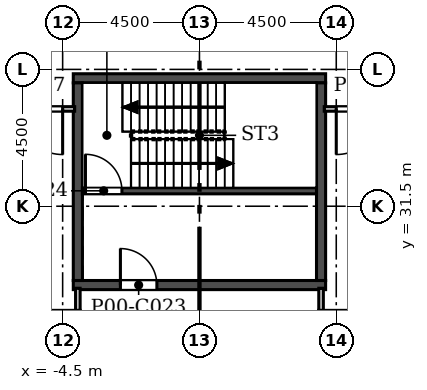
"""IFC4 building model, lengths in metres.
Left out: names, types, materials, properties, quantities, classifications, styles, units other than length and angle.
Written with IfcOpenShell. Run it as: python <this file> out.ifc"""

import sys

from ifc_helpers import new_model, si_unit, direction, frame, frame_2d, origin, place, context, subcontext, project, spatial, rectangle, extrude, element, fill, save


model = new_model("IFC4")
c1 = context("Model", 3, precision=1e-05, world=origin(), true_north=direction((0.0, 1.0)))
c2 = subcontext(c1, "Body", "Model", "MODEL_VIEW")
j1 = project(units=[si_unit("LENGTHUNIT", "METRE"), si_unit("PLANEANGLEUNIT", "RADIAN")], contexts=[c1])
p1 = place(None, origin())
s1 = spatial("IfcSite", under=j1, at=p1, CompositionType="ELEMENT")
p2 = place(p1, origin())
s2 = spatial("IfcBuilding", under=s1, at=p2, CompositionType="ELEMENT")
p3 = place(p2, origin())
s3 = spatial("IfcBuildingStorey", under=s2, at=p3, CompositionType="ELEMENT", Elevation=0.0)
p4 = place(p3, frame((-4.853, 74.393, 0.0), z_axis=(0.0, 0.0, 1.0), x_axis=(-0.499999725439, -0.866025562302, 0.0)))
e1 = element("IfcWall", 1, at=p4, inside=s3, PredefinedType="SOLIDWALL", context=c2, shape_type="SweptSolid", body=[
    extrude(rectangle(XDim=52.058, YDim=0.34, at=frame_2d((26.029, 0.0))), origin(), (0.0, 0.0, 1.0), 7.7),
])
p5 = place(p4, frame((19.058, 0.0, 0.9)))
e2 = element("IfcOpeningElement", 2, at=p5, cuts=e1, PredefinedType="OPENING", context=c2, shape_type="SweptSolid", body=[
    extrude(rectangle(XDim=1.885, YDim=3.5, at=frame_2d((0.942, 1.75))), frame((0.0, 0.18, 0.0), z_axis=(0.0, -1.0, 0.0), x_axis=(1.0, 0.0, 0.0)), (0.0, 0.0, 1.0), 0.36),
])
p6 = place(p4, frame((22.058, 0.0, 0.9)))
e3 = element("IfcOpeningElement", 3, at=p6, cuts=e1, PredefinedType="OPENING", context=c2, shape_type="SweptSolid", body=[
    extrude(rectangle(XDim=1.885, YDim=3.5, at=frame_2d((0.942, 1.75))), frame((0.0, 0.18, 0.0), z_axis=(0.0, -1.0, 0.0), x_axis=(1.0, 0.0, 0.0)), (0.0, 0.0, 1.0), 0.36),
])
p7 = place(p4, frame((40.058, 0.0, 0.9)))
e4 = element("IfcOpeningElement", 4, at=p7, cuts=e1, PredefinedType="OPENING", context=c2, shape_type="SweptSolid", body=[
    extrude(rectangle(XDim=1.885, YDim=3.5, at=frame_2d((0.942, 1.75))), frame((0.0, 0.18, 0.0), z_axis=(0.0, -1.0, 0.0), x_axis=(1.0, 0.0, 0.0)), (0.0, 0.0, 1.0), 0.36),
])
p8 = place(p4, frame((43.058, 0.0, 0.9)))
e5 = element("IfcOpeningElement", 5, at=p8, cuts=e1, PredefinedType="OPENING", context=c2, shape_type="SweptSolid", body=[
    extrude(rectangle(XDim=1.885, YDim=3.5, at=frame_2d((0.942, 1.75))), frame((0.0, 0.18, 0.0), z_axis=(0.0, -1.0, 0.0), x_axis=(1.0, 0.0, 0.0)), (0.0, 0.0, 1.0), 0.36),
])
p9 = place(p4, frame((48.279, 0.0, 0.0)))
e6 = element("IfcOpeningElement", 6, at=p9, cuts=e1, PredefinedType="OPENING", context=c2, shape_type="SweptSolid", body=[
    extrude(rectangle(XDim=2.4, YDim=2.7, at=frame_2d((1.2, 1.35))), frame((0.0, 0.18, 0.0), z_axis=(0.0, -1.0, 0.0), x_axis=(1.0, 0.0, 0.0)), (0.0, 0.0, 1.0), 0.36),
])
p10 = place(p4, frame((36.8, 0.0, 0.0)))
e7 = element("IfcOpeningElement", 7, at=p10, cuts=e1, PredefinedType="OPENING", context=c2, shape_type="SweptSolid", body=[
    extrude(rectangle(XDim=2.4, YDim=2.7, at=frame_2d((1.2, 1.35))), frame((0.0, 0.18, 0.0), z_axis=(0.0, -1.0, 0.0), x_axis=(1.0, 0.0, 0.0)), (0.0, 0.0, 1.0), 0.36),
])
p11 = place(p4, frame((31.06, 0.0, 0.0)))
e8 = element("IfcOpeningElement", 8, at=p11, cuts=e1, PredefinedType="OPENING", context=c2, shape_type="SweptSolid", body=[
    extrude(rectangle(XDim=2.4, YDim=2.7, at=frame_2d((1.2, 1.35))), frame((0.0, 0.18, 0.0), z_axis=(0.0, -1.0, 0.0), x_axis=(1.0, 0.0, 0.0)), (0.0, 0.0, 1.0), 0.36),
])
p12 = place(p4, frame((25.321, 0.0, 0.0)))
e9 = element("IfcOpeningElement", 9, at=p12, cuts=e1, PredefinedType="OPENING", context=c2, shape_type="SweptSolid", body=[
    extrude(rectangle(XDim=2.4, YDim=2.7, at=frame_2d((1.2, 1.35))), frame((0.0, 0.18, 0.0), z_axis=(0.0, -1.0, 0.0), x_axis=(1.0, 0.0, 0.0)), (0.0, 0.0, 1.0), 0.36),
])
p13 = place(p4, frame((13.842, 0.0, 0.0)))
e10 = element("IfcOpeningElement", 10, at=p13, cuts=e1, PredefinedType="OPENING", context=c2, shape_type="SweptSolid", body=[
    extrude(rectangle(XDim=2.4, YDim=2.7, at=frame_2d((1.2, 1.35))), frame((0.0, 0.18, 0.0), z_axis=(0.0, -1.0, 0.0), x_axis=(1.0, 0.0, 0.0)), (0.0, 0.0, 1.0), 0.36),
])
p14 = place(p4, frame((8.102, 0.0, 0.0)))
e11 = element("IfcOpeningElement", 11, at=p14, cuts=e1, PredefinedType="OPENING", context=c2, shape_type="SweptSolid", body=[
    extrude(rectangle(XDim=2.4, YDim=2.7, at=frame_2d((1.2, 1.35))), frame((0.0, 0.18, 0.0), z_axis=(0.0, -1.0, 0.0), x_axis=(1.0, 0.0, 0.0)), (0.0, 0.0, 1.0), 0.36),
])
p15 = place(p4, frame((2.363, 0.0, 0.0)))
e12 = element("IfcOpeningElement", 12, at=p15, cuts=e1, PredefinedType="OPENING", context=c2, shape_type="SweptSolid", body=[
    extrude(rectangle(XDim=2.4, YDim=2.7, at=frame_2d((1.2, 1.35))), frame((0.0, 0.18, 0.0), z_axis=(0.0, -1.0, 0.0), x_axis=(1.0, 0.0, 0.0)), (0.0, 0.0, 1.0), 0.36),
])
p16 = place(p3, frame((-4.15, 28.907, -0.4), z_axis=(0.0, 0.0, 1.0), x_axis=(1.0, 0.0, 0.0)))
e13 = element("IfcWall", 13, at=p16, inside=s3, PredefinedType="SOLIDWALL", context=c2, shape_type="SweptSolid", body=[
    extrude(rectangle(XDim=8.3, YDim=0.3, at=frame_2d((4.15, 0.0))), origin(), (0.0, 0.0, 1.0), 8.1),
])
p17 = place(p16, frame((1.55, 0.0, 0.4)))
e14 = element("IfcOpeningElement", 14, at=p17, cuts=e13, PredefinedType="OPENING", context=c2, shape_type="SweptSolid", body=[
    extrude(rectangle(XDim=1.2, YDim=2.1, at=frame_2d((0.6, 1.05))), frame((0.0, 0.16, 0.0), z_axis=(0.0, -1.0, 0.0), x_axis=(1.0, 0.0, 0.0)), (0.0, 0.0, 1.0), 0.32),
])
p18 = place(p3, frame((-4.15, 35.707, -0.4), z_axis=(0.0, 0.0, 1.0), x_axis=(1.0, 0.0, 0.0)))
e15 = element("IfcWall", 15, at=p18, inside=s3, PredefinedType="SOLIDWALL", context=c2, shape_type="SweptSolid", body=[
    extrude(rectangle(XDim=8.3, YDim=0.3, at=frame_2d((4.15, 0.0))), origin(), (0.0, 0.0, 1.0), 8.1),
])
for number, where, z_axis, x_axis in (
    (16, (-4.0, 29.057, -0.4), (0.0, 0.0, 1.0), (0.0, 1.0, 0.0)),
    (17, (4.0, 29.057, -0.4), (0.0, 0.0, 1.0), (0.0, 1.0, 0.0)),
):
    element("IfcWall", number, at=place(p3, frame(where, z_axis=z_axis, x_axis=x_axis)), inside=s3, PredefinedType="SOLIDWALL", context=c2, shape_type="SweptSolid", body=[
        extrude(rectangle(XDim=6.5, YDim=0.3, at=frame_2d((3.25, 0.0))), origin(), (0.0, 0.0, 1.0), 8.1),
    ])
p19 = place(p3, frame((-3.85, 32.007, -0.4), z_axis=(0.0, 0.0, 1.0), x_axis=(1.0, 0.0, 0.0)))
e18 = element("IfcWall", 18, at=p19, inside=s3, PredefinedType="SOLIDWALL", context=c2, shape_type="SweptSolid", body=[
    extrude(rectangle(XDim=7.7, YDim=0.2, at=frame_2d((3.85, 0.0))), origin(), (0.0, 0.0, 1.0), 8.1),
])
p20 = place(p19, frame((0.1, 0.0, 0.4)))
e19 = element("IfcOpeningElement", 19, at=p20, cuts=e18, PredefinedType="OPENING", context=c2, shape_type="SweptSolid", body=[
    extrude(rectangle(XDim=1.2, YDim=2.1, at=frame_2d((0.6, 1.05))), frame((0.0, 0.11, 0.0), z_axis=(0.0, -1.0, 0.0), x_axis=(1.0, 0.0, 0.0)), (0.0, 0.0, 1.0), 0.22),
])
p21 = place(p3, frame((-10.575, 28.0, 0.0), z_axis=(0.0, 0.0, 1.0), x_axis=(1.0, 0.0, 0.0)))
e20 = element("IfcWall", 20, at=p21, inside=s3, PredefinedType="PARTITIONING", context=c2, shape_type="SweptSolid", body=[
    extrude(rectangle(XDim=6.65, YDim=0.15, at=frame_2d((3.325, 0.0))), origin(), (0.0, 0.0, 1.0), 7.7),
])
p22 = place(p21, frame((2.475, 0.0, 0.0)))
e21 = element("IfcOpeningElement", 21, at=p22, cuts=e20, PredefinedType="OPENING", context=c2, shape_type="SweptSolid", body=[
    extrude(rectangle(XDim=3.0, YDim=2.4, at=frame_2d((1.5, 1.2))), frame((0.0, 0.085, 0.0), z_axis=(0.0, -1.0, 0.0), x_axis=(1.0, 0.0, 0.0)), (0.0, 0.0, 1.0), 0.17),
])
p23 = place(p3, frame((3.925, 28.0, 0.0), z_axis=(0.0, 0.0, 1.0), x_axis=(1.0, 0.0, 0.0)))
e22 = element("IfcWall", 22, at=p23, inside=s3, PredefinedType="PARTITIONING", context=c2, shape_type="SweptSolid", body=[
    extrude(rectangle(XDim=3.2, YDim=0.15, at=frame_2d((1.6, 0.0))), origin(), (0.0, 0.0, 1.0), 7.7),
])
p24 = place(p23, frame((0.08, 0.0, 0.0)))
e23 = element("IfcOpeningElement", 23, at=p24, cuts=e22, PredefinedType="OPENING", context=c2, shape_type="SweptSolid", body=[
    extrude(rectangle(XDim=3.0, YDim=2.4, at=frame_2d((1.5, 1.2))), frame((0.0, 0.085, 0.0), z_axis=(0.0, -1.0, 0.0), x_axis=(1.0, 0.0, 0.0)), (0.0, 0.0, 1.0), 0.17),
])
for number, where, z_axis, x_axis in (
    (24, (-4.0, 28.075, 0.0), (0.0, 0.0, 1.0), (0.0, 1.0, 0.0)),
    (25, (4.0, 28.802, 0.0), (0.0, 0.0, 1.0), (0.0, -1.0, 0.0)),
):
    element("IfcWall", number, at=place(p3, frame(where, z_axis=z_axis, x_axis=x_axis)), inside=s3, PredefinedType="PARTITIONING", context=c2, shape_type="SweptSolid", body=[
        extrude(rectangle(XDim=0.727, YDim=0.15, at=frame_2d((0.364, 0.0))), origin(), (0.0, 0.0, 1.0), 7.7),
    ])
p25 = place(p3, frame((-4.105, 34.7, 0.0), z_axis=(0.0, 0.0, 1.0), x_axis=(-1.0, 0.0, 0.0)))
e26 = element("IfcWall", 26, at=p25, inside=s3, PredefinedType="PARTITIONING", context=c2, shape_type="SweptSolid", body=[
    extrude(rectangle(XDim=4.47, YDim=0.15, at=frame_2d((2.235, 0.0))), origin(), (0.0, 0.0, 1.0), 7.7),
])
p26 = place(p25, frame((0.395, 0.0, 0.0)))
e27 = element("IfcOpeningElement", 27, at=p26, cuts=e26, PredefinedType="OPENING", context=c2, shape_type="SweptSolid", body=[
    extrude(rectangle(XDim=3.0, YDim=2.4, at=frame_2d((1.5, 1.2))), frame((0.0, 0.085, 0.0), z_axis=(0.0, -1.0, 0.0), x_axis=(1.0, 0.0, 0.0)), (0.0, 0.0, 1.0), 0.17),
])
p27 = place(p3, frame((16.075, 34.7, 0.0), z_axis=(0.0, 0.0, 1.0), x_axis=(-1.0, 0.0, 0.0)))
e28 = element("IfcWall", 28, at=p27, inside=s3, PredefinedType="PARTITIONING", context=c2, shape_type="SweptSolid", body=[
    extrude(rectangle(XDim=11.97, YDim=0.15, at=frame_2d((5.985, 0.0))), origin(), (0.0, 0.0, 1.0), 7.7),
])
p28 = place(p27, frame((8.575, 0.0, 0.0)))
e29 = element("IfcOpeningElement", 29, at=p28, cuts=e28, PredefinedType="OPENING", context=c2, shape_type="SweptSolid", body=[
    extrude(rectangle(XDim=3.0, YDim=2.4, at=frame_2d((1.5, 1.2))), frame((0.0, 0.085, 0.0), z_axis=(0.0, -1.0, 0.0), x_axis=(1.0, 0.0, 0.0)), (0.0, 0.0, 1.0), 0.17),
])
p29 = place(p17, origin())
e30 = element("IfcDoor", 30, at=p29, inside=s3, OperationType="SINGLE_SWING_LEFT", PredefinedType="DOOR", context=c2, shape_type="SweptSolid", body=[
    extrude(rectangle(XDim=1.2, YDim=2.1, at=frame_2d((0.6, 1.05))), frame((0.0, 0.025, 0.0), z_axis=(0.0, -1.0, 0.0), x_axis=(1.0, 0.0, 0.0)), (0.0, 0.0, 1.0), 0.05),
])
fill(e14, e30)
p30 = place(p20, origin())
e31 = element("IfcDoor", 31, at=p30, inside=s3, OperationType="SINGLE_SWING_LEFT", PredefinedType="DOOR", context=c2, shape_type="SweptSolid", body=[
    extrude(rectangle(XDim=1.2, YDim=2.1, at=frame_2d((0.6, 1.05))), frame((0.0, 0.025, 0.0), z_axis=(0.0, -1.0, 0.0), x_axis=(1.0, 0.0, 0.0)), (0.0, 0.0, 1.0), 0.05),
])
fill(e19, e31)
p31 = place(p26, origin())
e32 = element("IfcDoor", 32, at=p31, inside=s3, OperationType="DOUBLE_DOOR_SINGLE_SWING", PredefinedType="DOOR", context=c2, shape_type="SweptSolid", body=[
    extrude(rectangle(XDim=3.0, YDim=2.4, at=frame_2d((1.5, 1.2))), frame((0.0, 0.025, 0.0), z_axis=(0.0, -1.0, 0.0), x_axis=(1.0, 0.0, 0.0)), (0.0, 0.0, 1.0), 0.05),
])
fill(e27, e32)
p32 = place(p28, origin())
e33 = element("IfcDoor", 33, at=p32, inside=s3, OperationType="DOUBLE_DOOR_SINGLE_SWING", PredefinedType="DOOR", context=c2, shape_type="SweptSolid", body=[
    extrude(rectangle(XDim=3.0, YDim=2.4, at=frame_2d((1.5, 1.2))), frame((0.0, 0.025, 0.0), z_axis=(0.0, -1.0, 0.0), x_axis=(1.0, 0.0, 0.0)), (0.0, 0.0, 1.0), 0.05),
])
fill(e29, e33)
save(model, sys.argv[1])
